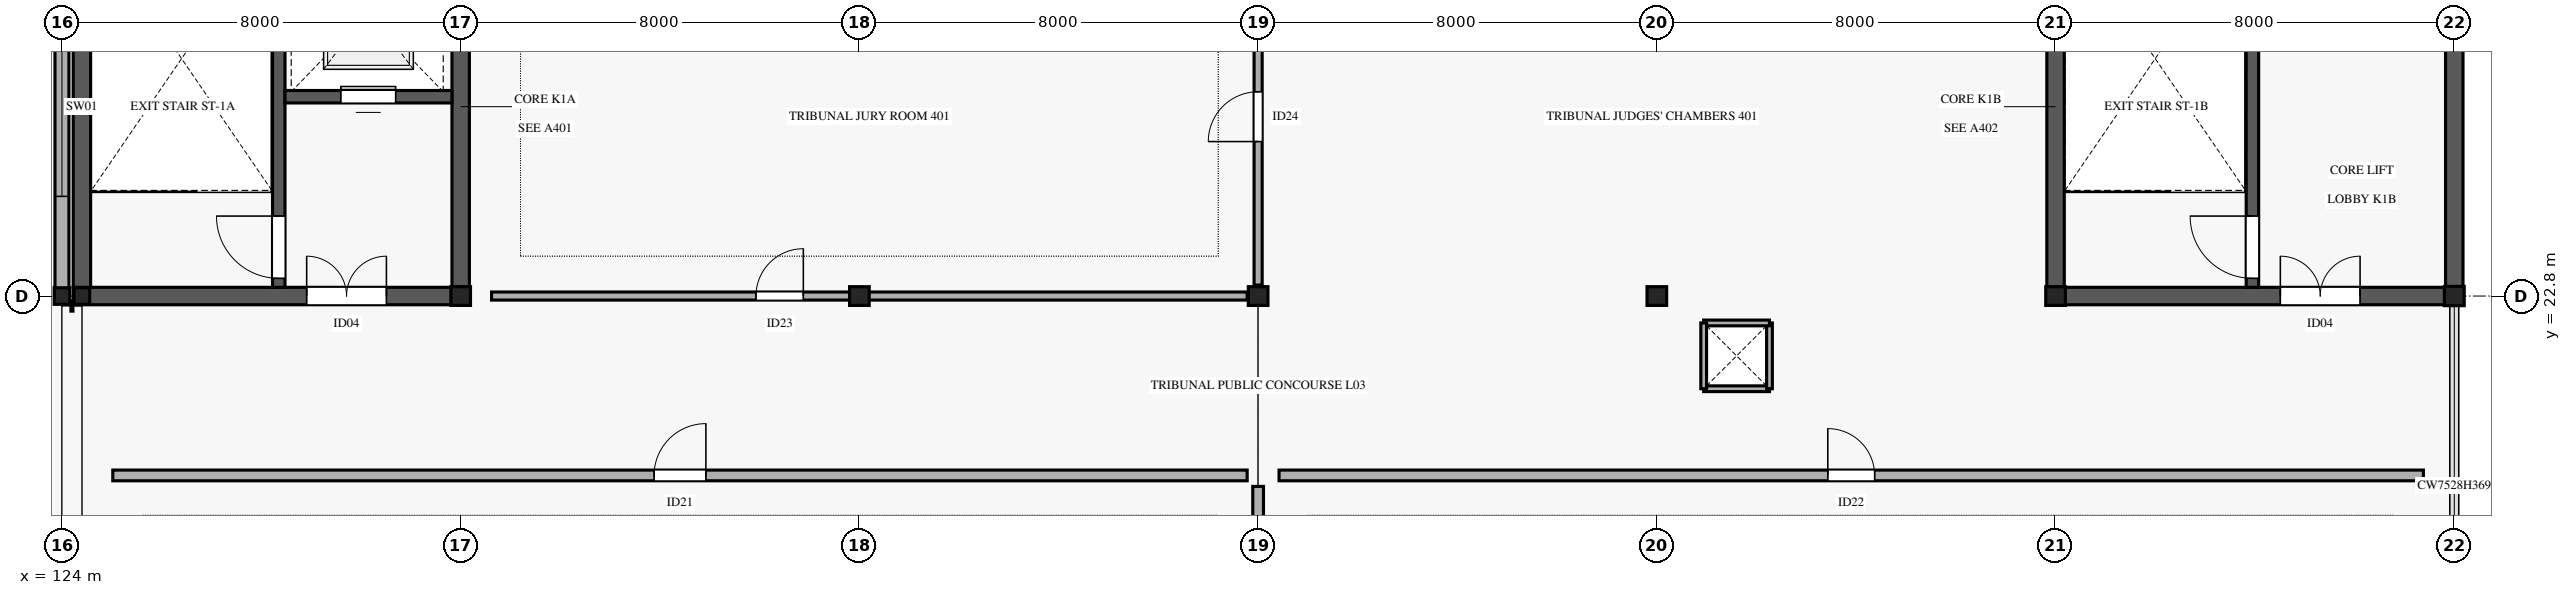
"""IFC4 building model, lengths in metres.
Left out: names, types, materials, properties, quantities, classifications, styles, units other than length and angle.
Written with IfcOpenShell. Run it as: python <this file> out.ifc"""

import sys

from ifc_helpers import new_model, si_unit, direction, frame, frame_2d, origin, origin_2d, place, context, subcontext, project, spatial, rectangle, i_section, extrude, element, fill, save


model = new_model("IFC4")
c1 = context("Model", 3, precision=1e-05, world=origin(), true_north=direction((0.0, 1.0)))
c2 = subcontext(c1, "Body", "Model", "MODEL_VIEW")
j1 = project(units=[si_unit("LENGTHUNIT", "METRE"), si_unit("PLANEANGLEUNIT", "RADIAN")], contexts=[c1])
p1 = place(None, origin())
s1 = spatial("IfcSite", under=j1, at=p1, CompositionType="ELEMENT")
p2 = place(p1, origin())
s2 = spatial("IfcBuilding", under=s1, at=p2, CompositionType="ELEMENT")
p3 = place(p2, frame((0.0, 0.0, 15.6)))
s3 = spatial("IfcBuildingStorey", under=s2, at=p3, CompositionType="ELEMENT", Elevation=15.6)
p4 = place(p3, frame((124.4, 22.8, 0.0), z_axis=(0.0, 0.0, 1.0), x_axis=(1.0, 0.0, 0.0)))
e1 = element("IfcColumn", 1, at=p4, inside=s3, PredefinedType="COLUMN", context=c2, shape_type="SweptSolid", body=[
    extrude(i_section(OverallWidth=0.313, OverallDepth=0.333, WebThickness=0.018, FlangeThickness=0.028, FilletRadius=0.015, at=origin_2d()), origin(), (0.0, 0.0, 1.0), 4.595),
])
for number, where, z_axis, x_axis in (
    (2, (132.0, 22.8, 0.0), (0.0, 0.0, 1.0), (1.0, 0.0, 0.0)),
    (3, (140.0, 22.8, 0.0), (0.0, 0.0, 1.0), (1.0, 0.0, 0.0)),
    (4, (148.0, 22.8, 0.0), (0.0, 0.0, 1.0), (1.0, 0.0, 0.0)),
    (5, (156.0, 22.8, 0.0), (0.0, 0.0, 1.0), (1.0, 0.0, 0.0)),
    (6, (164.0, 22.8, 0.0), (0.0, 0.0, 1.0), (1.0, 0.0, 0.0)),
):
    element("IfcColumn", number, at=place(p3, frame(where, z_axis=z_axis, x_axis=x_axis)), inside=s3, PredefinedType="COLUMN", context=c2, shape_type="SweptSolid", body=[
        extrude(i_section(OverallWidth=0.394, OverallDepth=0.376, WebThickness=0.017, FlangeThickness=0.028, FilletRadius=0.015, at=origin_2d()), origin(), (0.0, 0.0, 1.0), 4.595),
    ])
p5 = place(p3, frame((172.0, 22.8, 0.0), z_axis=(0.0, 0.0, 1.0), x_axis=(1.0, 0.0, 0.0)))
e7 = element("IfcColumn", 7, at=p5, inside=s3, PredefinedType="COLUMN", context=c2, shape_type="SweptSolid", body=[
    extrude(i_section(OverallWidth=0.399, OverallDepth=0.387, WebThickness=0.021, FlangeThickness=0.033, FilletRadius=0.015, at=origin_2d()), origin(), (0.0, 0.0, 1.0), 4.595),
])
p6 = place(p3, frame((124.0, 22.8, 0.0), z_axis=(0.0, 0.0, 1.0), x_axis=(1.0, 0.0, 0.0)))
e8 = element("IfcColumn", 8, at=p6, inside=s3, PredefinedType="COLUMN", context=c2, shape_type="SweptSolid", body=[
    extrude(i_section(OverallWidth=0.313, OverallDepth=0.333, WebThickness=0.018, FlangeThickness=0.028, FilletRadius=0.015, at=origin_2d()), origin(), (0.0, 0.0, 1.0), 4.59),
])
p7 = place(p3, frame((124.0, 30.42, 0.0), z_axis=(0.0, 0.0, 1.0), x_axis=(0.0, -1.0, 0.0)))
e9 = element("IfcWall", 9, at=p7, inside=s3, PredefinedType="STANDARD", context=c2, shape_type="SweptSolid", body=[
    extrude(rectangle(XDim=7.64, YDim=0.28, at=frame_2d((3.82, 0.0))), origin(), (0.0, 0.0, 1.0), 3.66),
])
p8 = place(p7, frame((2.02, 0.0, 0.75)))
e10 = element("IfcOpeningElement", 10, at=p8, cuts=e9, PredefinedType="OPENING", context=c2, shape_type="SweptSolid", body=[
    extrude(rectangle(XDim=3.6, YDim=2.15, at=frame_2d((1.8, 1.075))), frame((0.0, 0.15, 0.0), z_axis=(0.0, -1.0, 0.0), x_axis=(1.0, 0.0, 0.0)), (0.0, 0.0, 1.0), 0.3),
])
p9 = place(p3, frame((124.18, 22.6, 0.0), z_axis=(0.0, 0.0, 1.0), x_axis=(1.0, 0.0, 0.0)))
e11 = element("IfcWall", 11, at=p9, inside=s3, PredefinedType="STANDARD", context=c2, shape_type="SweptSolid", body=[
    extrude(rectangle(XDim=0.04, YDim=0.205, at=frame_2d((0.02, 0.0))), origin(), (0.0, 0.0, 1.0), 4.02),
])
for number, where, z_axis, x_axis in (
    (12, (156.94, 20.94, 0.0), (0.0, 0.0, 1.0), (1.0, 0.0, 0.0)),
    (13, (158.26, 20.94, 0.0), (0.0, 0.0, 1.0), (0.0, 1.0, 0.0)),
    (14, (158.26, 22.26, 0.0), (0.0, 0.0, 1.0), (-1.0, 0.0, 0.0)),
    (15, (156.94, 22.26, 0.0), (0.0, 0.0, 1.0), (0.0, -1.0, 0.0)),
):
    element("IfcWall", number, at=place(p3, frame(where, z_axis=z_axis, x_axis=x_axis)), inside=s3, PredefinedType="PARTITIONING", context=c2, shape_type="SweptSolid", body=[
        extrude(rectangle(XDim=1.32, YDim=0.115, at=frame_2d((0.66, 0.0))), origin(), (0.0, 0.0, 1.0), 3.75),
    ])
p10 = place(p3, frame((124.225, 22.8, 0.0), z_axis=(0.0, 0.0, 1.0), x_axis=(1.0, 0.0, 0.0)))
e16 = element("IfcWall", 16, at=p10, inside=s3, PredefinedType="SHEAR", context=c2, shape_type="SweptSolid", body=[
    extrude(rectangle(XDim=7.95, YDim=0.35, at=frame_2d((3.975, 0.0))), origin(), (0.0, 0.0, 1.0), 4.59),
])
p11 = place(p10, frame((4.685, 0.0, 0.0)))
e17 = element("IfcOpeningElement", 17, at=p11, cuts=e16, PredefinedType="OPENING", context=c2, shape_type="SweptSolid", body=[
    extrude(rectangle(XDim=1.6, YDim=2.35, at=frame_2d((0.8, 1.175))), frame((0.0, 0.185, 0.0), z_axis=(0.0, -1.0, 0.0), x_axis=(1.0, 0.0, 0.0)), (0.0, 0.0, 1.0), 0.37),
])
for number, where, z_axis, x_axis in (
    (18, (124.4, 22.975, 0.0), (0.0, 0.0, 1.0), (0.0, 1.0, 0.0)),
    (19, (132.0, 22.975, 0.0), (0.0, 0.0, 1.0), (0.0, 1.0, 0.0)),
):
    element("IfcWall", number, at=place(p3, frame(where, z_axis=z_axis, x_axis=x_axis)), inside=s3, PredefinedType="SHEAR", context=c2, shape_type="SweptSolid", body=[
        extrude(rectangle(XDim=7.25, YDim=0.35, at=frame_2d((3.625, 0.0))), origin(), (0.0, 0.0, 1.0), 4.59),
    ])
p12 = place(p3, frame((128.35, 22.975, 0.0), z_axis=(0.0, 0.0, 1.0), x_axis=(0.0, 1.0, 0.0)))
e20 = element("IfcWall", 20, at=p12, inside=s3, PredefinedType="SHEAR", context=c2, shape_type="SweptSolid", body=[
    extrude(rectangle(XDim=7.25, YDim=0.25, at=frame_2d((3.625, 0.0))), origin(), (0.0, 0.0, 1.0), 4.59),
])
p13 = place(p12, frame((0.18, 0.0, 0.0)))
e21 = element("IfcOpeningElement", 21, at=p13, cuts=e20, PredefinedType="OPENING", context=c2, shape_type="SweptSolid", body=[
    extrude(rectangle(XDim=1.25, YDim=2.2, at=frame_2d((0.625, 1.1))), frame((0.0, 0.135, 0.0), z_axis=(0.0, -1.0, 0.0), x_axis=(1.0, 0.0, 0.0)), (0.0, 0.0, 1.0), 0.27),
])
p14 = place(p3, frame((128.475, 26.8, 0.0), z_axis=(0.0, 0.0, 1.0), x_axis=(1.0, 0.0, 0.0)))
e22 = element("IfcWall", 22, at=p14, inside=s3, PredefinedType="SHEAR", context=c2, shape_type="SweptSolid", body=[
    extrude(rectangle(XDim=3.35, YDim=0.25, at=frame_2d((1.675, 0.0))), origin(), (0.0, 0.0, 1.0), 4.59),
])
p15 = place(p14, frame((1.12, 0.0, 0.0)))
e23 = element("IfcOpeningElement", 23, at=p15, cuts=e22, PredefinedType="OPENING", context=c2, shape_type="SweptSolid", body=[
    extrude(rectangle(XDim=1.1, YDim=2.2, at=frame_2d((0.55, 1.1))), frame((0.0, 0.135, 0.0), z_axis=(0.0, -1.0, 0.0), x_axis=(1.0, 0.0, 0.0)), (0.0, 0.0, 1.0), 0.27),
])
p16 = place(p3, frame((163.825, 22.8, 0.0), z_axis=(0.0, 0.0, 1.0), x_axis=(1.0, 0.0, 0.0)))
e24 = element("IfcWall", 24, at=p16, inside=s3, PredefinedType="SHEAR", context=c2, shape_type="SweptSolid", body=[
    extrude(rectangle(XDim=8.35, YDim=0.35, at=frame_2d((4.175, 0.0))), origin(), (0.0, 0.0, 1.0), 4.59),
])
p17 = place(p16, frame((4.685, 0.0, 0.0)))
e25 = element("IfcOpeningElement", 25, at=p17, cuts=e24, PredefinedType="OPENING", context=c2, shape_type="SweptSolid", body=[
    extrude(rectangle(XDim=1.6, YDim=2.35, at=frame_2d((0.8, 1.175))), frame((0.0, 0.185, 0.0), z_axis=(0.0, -1.0, 0.0), x_axis=(1.0, 0.0, 0.0)), (0.0, 0.0, 1.0), 0.37),
])
for number, where, z_axis, x_axis in (
    (26, (164.0, 22.975, 0.0), (0.0, 0.0, 1.0), (0.0, 1.0, 0.0)),
    (27, (172.0, 22.975, 0.0), (0.0, 0.0, 1.0), (0.0, 1.0, 0.0)),
):
    element("IfcWall", number, at=place(p3, frame(where, z_axis=z_axis, x_axis=x_axis)), inside=s3, PredefinedType="SHEAR", context=c2, shape_type="SweptSolid", body=[
        extrude(rectangle(XDim=7.25, YDim=0.35, at=frame_2d((3.625, 0.0))), origin(), (0.0, 0.0, 1.0), 4.59),
    ])
p18 = place(p3, frame((167.95, 22.975, 0.0), z_axis=(0.0, 0.0, 1.0), x_axis=(0.0, 1.0, 0.0)))
e28 = element("IfcWall", 28, at=p18, inside=s3, PredefinedType="SHEAR", context=c2, shape_type="SweptSolid", body=[
    extrude(rectangle(XDim=7.25, YDim=0.25, at=frame_2d((3.625, 0.0))), origin(), (0.0, 0.0, 1.0), 4.59),
])
p19 = place(p18, frame((0.18, 0.0, 0.0)))
e29 = element("IfcOpeningElement", 29, at=p19, cuts=e28, PredefinedType="OPENING", context=c2, shape_type="SweptSolid", body=[
    extrude(rectangle(XDim=1.25, YDim=2.2, at=frame_2d((0.625, 1.1))), frame((0.0, 0.135, 0.0), z_axis=(0.0, -1.0, 0.0), x_axis=(1.0, 0.0, 0.0)), (0.0, 0.0, 1.0), 0.27),
])
p20 = place(p3, frame((125.02, 19.2, 0.0), z_axis=(0.0, 0.0, 1.0), x_axis=(1.0, 0.0, 0.0)))
e30 = element("IfcWall", 30, at=p20, inside=s3, PredefinedType="PARTITIONING", context=c2, shape_type="SweptSolid", body=[
    extrude(rectangle(XDim=22.76, YDim=0.215, at=frame_2d((11.38, 0.0))), origin(), (0.0, 0.0, 1.0), 3.45),
])
p21 = place(p20, frame((10.86, 0.0, 0.0)))
e31 = element("IfcOpeningElement", 31, at=p21, cuts=e30, PredefinedType="OPENING", context=c2, shape_type="SweptSolid", body=[
    extrude(rectangle(XDim=1.04, YDim=2.2, at=frame_2d((0.52, 1.1))), frame((0.0, 0.117, 0.0), z_axis=(0.0, -1.0, 0.0), x_axis=(1.0, 0.0, 0.0)), (0.0, 0.0, 1.0), 0.235),
])
p22 = place(p3, frame((148.0, 0.62, 0.0), z_axis=(0.0, 0.0, 1.0), x_axis=(0.0, 1.0, 0.0)))
e32 = element("IfcWall", 32, at=p22, inside=s3, PredefinedType="PARTITIONING", context=c2, shape_type="SweptSolid", body=[
    extrude(rectangle(XDim=18.36, YDim=0.215, at=frame_2d((9.18, 0.0))), origin(), (0.0, 0.0, 1.0), 3.45),
])
p23 = place(p3, frame((148.42, 19.2, 0.0), z_axis=(0.0, 0.0, 1.0), x_axis=(1.0, 0.0, 0.0)))
e33 = element("IfcWall", 33, at=p23, inside=s3, PredefinedType="PARTITIONING", context=c2, shape_type="SweptSolid", body=[
    extrude(rectangle(XDim=22.96, YDim=0.215, at=frame_2d((11.48, 0.0))), origin(), (0.0, 0.0, 1.0), 3.45),
])
p24 = place(p23, frame((11.01, 0.0, 0.0)))
e34 = element("IfcOpeningElement", 34, at=p24, cuts=e33, PredefinedType="OPENING", context=c2, shape_type="SweptSolid", body=[
    extrude(rectangle(XDim=0.94, YDim=2.2, at=frame_2d((0.47, 1.1))), frame((0.0, 0.117, 0.0), z_axis=(0.0, -1.0, 0.0), x_axis=(1.0, 0.0, 0.0)), (0.0, 0.0, 1.0), 0.235),
])
p25 = place(p3, frame((132.62, 22.8, 0.0), z_axis=(0.0, 0.0, 1.0), x_axis=(1.0, 0.0, 0.0)))
e35 = element("IfcWall", 35, at=p25, inside=s3, PredefinedType="PARTITIONING", context=c2, shape_type="SweptSolid", body=[
    extrude(rectangle(XDim=15.16, YDim=0.162, at=frame_2d((7.58, 0.0))), origin(), (0.0, 0.0, 1.0), 3.45),
])
p26 = place(p25, frame((5.305, 0.0, 0.0)))
e36 = element("IfcOpeningElement", 36, at=p26, cuts=e35, PredefinedType="OPENING", context=c2, shape_type="SweptSolid", body=[
    extrude(rectangle(XDim=0.95, YDim=2.15, at=frame_2d((0.475, 1.075))), frame((0.0, 0.091, 0.0), z_axis=(0.0, -1.0, 0.0), x_axis=(1.0, 0.0, 0.0)), (0.0, 0.0, 1.0), 0.182),
])
p27 = place(p3, frame((148.0, 23.02, 0.0), z_axis=(0.0, 0.0, 1.0), x_axis=(0.0, 1.0, 0.0)))
e37 = element("IfcWall", 37, at=p27, inside=s3, PredefinedType="PARTITIONING", context=c2, shape_type="SweptSolid", body=[
    extrude(rectangle(XDim=6.76, YDim=0.162, at=frame_2d((3.38, 0.0))), origin(), (0.0, 0.0, 1.0), 3.45),
])
p28 = place(p27, frame((2.88, 0.0, 0.0)))
e38 = element("IfcOpeningElement", 38, at=p28, cuts=e37, PredefinedType="OPENING", context=c2, shape_type="SweptSolid", body=[
    extrude(rectangle(XDim=1.0, YDim=2.15, at=frame_2d((0.5, 1.075))), frame((0.0, 0.091, 0.0), z_axis=(0.0, -1.0, 0.0), x_axis=(1.0, 0.0, 0.0)), (0.0, 0.0, 1.0), 0.182),
])
p29 = place(p8, origin())
e39 = element("IfcWindow", 39, at=p29, inside=s3, PartitioningType="SINGLE_PANEL", PredefinedType="WINDOW", context=c2, shape_type="SweptSolid", body=[
    extrude(rectangle(XDim=3.6, YDim=2.15, at=frame_2d((1.8, 1.075))), frame((0.0, 0.03, 0.0), z_axis=(0.0, -1.0, 0.0), x_axis=(1.0, 0.0, 0.0)), (0.0, 0.0, 1.0), 0.06),
])
fill(e10, e39)
p30 = place(p13, origin())
e40 = element("IfcDoor", 40, at=p30, inside=s3, OperationType="SINGLE_SWING_RIGHT", PredefinedType="DOOR", context=c2, shape_type="SweptSolid", body=[
    extrude(rectangle(XDim=1.25, YDim=2.2, at=frame_2d((0.625, 1.1))), frame((0.0, 0.025, 0.0), z_axis=(0.0, -1.0, 0.0), x_axis=(1.0, 0.0, 0.0)), (0.0, 0.0, 1.0), 0.05),
])
fill(e21, e40)
p31 = place(p11, origin())
e41 = element("IfcDoor", 41, at=p31, inside=s3, OperationType="DOUBLE_DOOR_SINGLE_SWING", PredefinedType="DOOR", context=c2, shape_type="SweptSolid", body=[
    extrude(rectangle(XDim=1.6, YDim=2.35, at=frame_2d((0.8, 1.175))), frame((0.0, 0.025, 0.0), z_axis=(0.0, -1.0, 0.0), x_axis=(1.0, 0.0, 0.0)), (0.0, 0.0, 1.0), 0.05),
])
fill(e17, e41)
p32 = place(p15, origin())
e42 = element("IfcDoor", 42, at=p32, inside=s3, OperationType="SLIDING_TO_LEFT", PredefinedType="DOOR", context=c2, shape_type="SweptSolid", body=[
    extrude(rectangle(XDim=1.1, YDim=2.2, at=frame_2d((0.55, 1.1))), frame((0.0, 0.025, 0.0), z_axis=(0.0, -1.0, 0.0), x_axis=(1.0, 0.0, 0.0)), (0.0, 0.0, 1.0), 0.05),
])
fill(e23, e42)
p33 = place(p19, origin())
e43 = element("IfcDoor", 43, at=p33, inside=s3, OperationType="SINGLE_SWING_RIGHT", PredefinedType="DOOR", context=c2, shape_type="SweptSolid", body=[
    extrude(rectangle(XDim=1.25, YDim=2.2, at=frame_2d((0.625, 1.1))), frame((0.0, 0.025, 0.0), z_axis=(0.0, -1.0, 0.0), x_axis=(1.0, 0.0, 0.0)), (0.0, 0.0, 1.0), 0.05),
])
fill(e29, e43)
p34 = place(p17, origin())
e44 = element("IfcDoor", 44, at=p34, inside=s3, OperationType="DOUBLE_DOOR_SINGLE_SWING", PredefinedType="DOOR", context=c2, shape_type="SweptSolid", body=[
    extrude(rectangle(XDim=1.6, YDim=2.35, at=frame_2d((0.8, 1.175))), frame((0.0, 0.025, 0.0), z_axis=(0.0, -1.0, 0.0), x_axis=(1.0, 0.0, 0.0)), (0.0, 0.0, 1.0), 0.05),
])
fill(e25, e44)
p35 = place(p21, origin())
e45 = element("IfcDoor", 45, at=p35, inside=s3, OperationType="SINGLE_SWING_RIGHT", PredefinedType="DOOR", context=c2, shape_type="SweptSolid", body=[
    extrude(rectangle(XDim=1.04, YDim=2.2, at=frame_2d((0.52, 1.1))), frame((0.0, 0.025, 0.0), z_axis=(0.0, -1.0, 0.0), x_axis=(1.0, 0.0, 0.0)), (0.0, 0.0, 1.0), 0.05),
])
fill(e31, e45)
p36 = place(p24, origin())
e46 = element("IfcDoor", 46, at=p36, inside=s3, OperationType="SINGLE_SWING_LEFT", PredefinedType="DOOR", context=c2, shape_type="SweptSolid", body=[
    extrude(rectangle(XDim=0.94, YDim=2.2, at=frame_2d((0.47, 1.1))), frame((0.0, 0.025, 0.0), z_axis=(0.0, -1.0, 0.0), x_axis=(1.0, 0.0, 0.0)), (0.0, 0.0, 1.0), 0.05),
])
fill(e34, e46)
p37 = place(p26, origin())
e47 = element("IfcDoor", 47, at=p37, inside=s3, OperationType="SINGLE_SWING_RIGHT", PredefinedType="DOOR", context=c2, shape_type="SweptSolid", body=[
    extrude(rectangle(XDim=0.95, YDim=2.15, at=frame_2d((0.475, 1.075))), frame((0.0, 0.025, 0.0), z_axis=(0.0, -1.0, 0.0), x_axis=(1.0, 0.0, 0.0)), (0.0, 0.0, 1.0), 0.05),
])
fill(e36, e47)
p38 = place(p28, origin())
e48 = element("IfcDoor", 48, at=p38, inside=s3, OperationType="SINGLE_SWING_LEFT", PredefinedType="DOOR", context=c2, shape_type="SweptSolid", body=[
    extrude(rectangle(XDim=1.0, YDim=2.15, at=frame_2d((0.5, 1.075))), frame((0.0, 0.025, 0.0), z_axis=(0.0, -1.0, 0.0), x_axis=(1.0, 0.0, 0.0)), (0.0, 0.0, 1.0), 0.05),
])
fill(e38, e48)
save(model, sys.argv[1])
